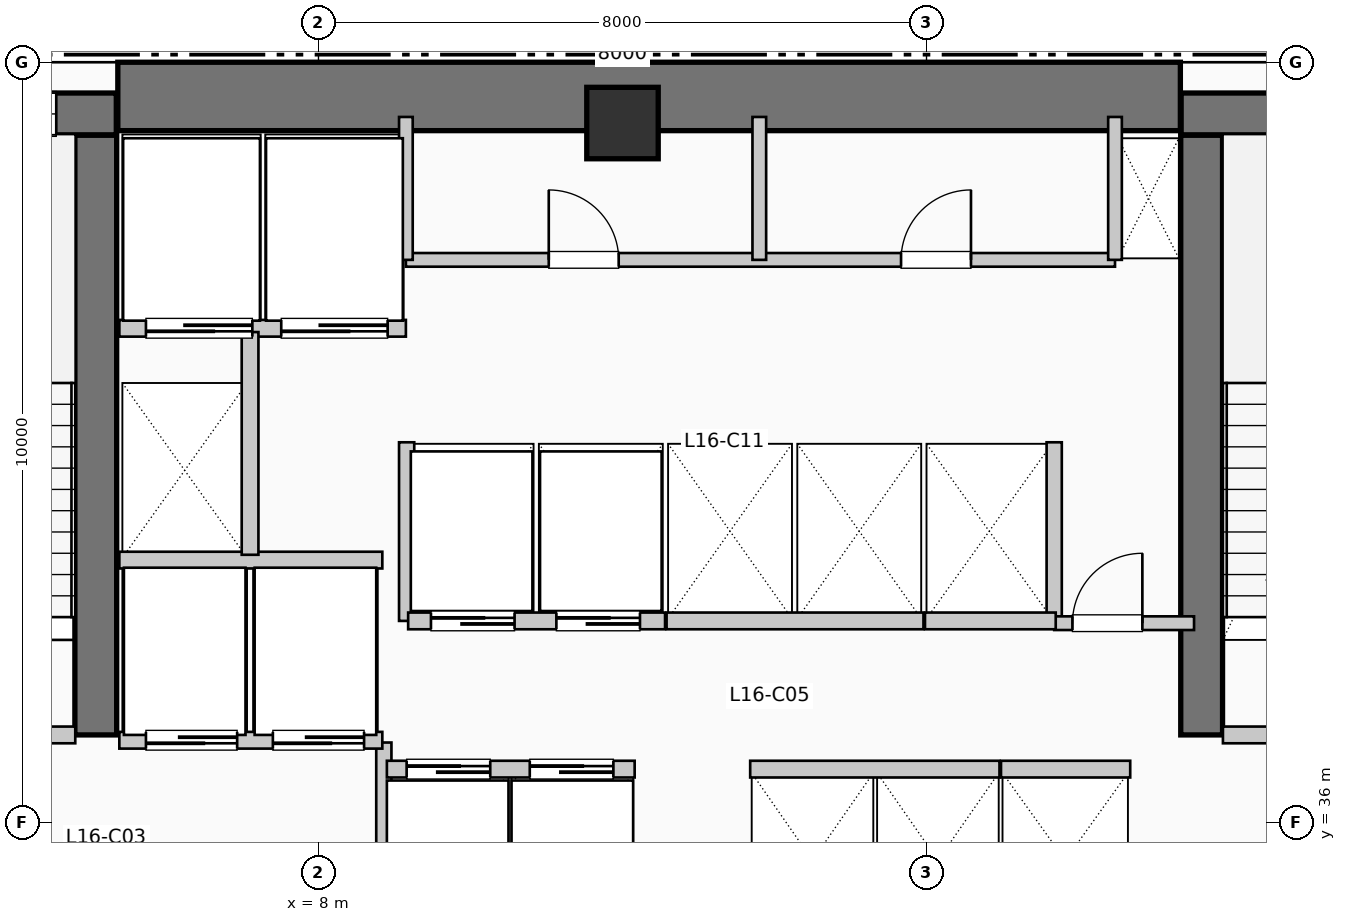
"""IFC4 building model, lengths in metres.
Left out: names, types, materials, properties, quantities, classifications, styles, units other than length and angle.
Written with IfcOpenShell. Run it as: python <this file> out.ifc"""

import sys

from ifc_helpers import new_model, si_unit, direction, frame, frame_2d, origin, origin_2d, place, context, subcontext, project, spatial, rectangle, extrude, element, fill, save


model = new_model("IFC4")
c1 = context("Model", 3, precision=1e-05, world=origin(), true_north=direction((0.0, 1.0)))
c2 = subcontext(c1, "Body", "Model", "MODEL_VIEW")
j1 = project(units=[si_unit("LENGTHUNIT", "METRE"), si_unit("PLANEANGLEUNIT", "RADIAN")], contexts=[c1])
p1 = place(None, origin())
s1 = spatial("IfcSite", under=j1, at=p1, CompositionType="ELEMENT")
p2 = place(p1, origin())
s2 = spatial("IfcBuilding", under=s1, at=p2, CompositionType="ELEMENT")
p3 = place(p2, frame((0.0, 0.0, 69.96)))
s3 = spatial("IfcBuildingStorey", under=s2, at=p3, CompositionType="ELEMENT", Elevation=69.96)
p4 = place(p3, frame((5.36, 45.55, 0.0), z_axis=(0.0, 0.0, 1.0), x_axis=(1.0, 0.0, 0.0)))
e1 = element("IfcWall", 1, at=p4, inside=s3, PredefinedType="SHEAR", context=c2, shape_type="SweptSolid", body=[
    extrude(rectangle(XDim=13.98, YDim=0.9, at=frame_2d((6.99, 0.0))), origin(), (0.0, 0.0, 1.0), 3.96),
])
p5 = place(p3, frame((5.07, 37.15, 0.0), z_axis=(0.0, 0.0, 1.0), x_axis=(0.0, 1.0, 0.0)))
e2 = element("IfcWall", 2, at=p5, inside=s3, PredefinedType="SHEAR", context=c2, shape_type="SweptSolid", body=[
    extrude(rectangle(XDim=7.89, YDim=0.55, at=frame_2d((3.945, 0.0))), origin(), (0.0, 0.0, 1.0), 3.96),
])
p6 = place(p3, frame((1.1, 45.32, 0.0), z_axis=(0.0, 0.0, 1.0), x_axis=(1.0, 0.0, 0.0)))
e3 = element("IfcWall", 3, at=p6, inside=s3, PredefinedType="SHEAR", context=c2, shape_type="SweptSolid", body=[
    extrude(rectangle(XDim=4.24, YDim=0.55, at=frame_2d((2.12, 0.0))), origin(), (0.0, 0.0, 1.0), 3.96),
])
p7 = place(p6, frame((2.05, 0.0, 1.05)))
e4 = element("IfcOpeningElement", 4, at=p7, cuts=e3, PredefinedType="OPENING", context=c2, shape_type="SweptSolid", body=[
    extrude(rectangle(XDim=1.4, YDim=1.8, at=frame_2d((0.7, 0.9))), frame((0.0, 0.285, 0.0), z_axis=(0.0, -1.0, 0.0), x_axis=(1.0, 0.0, 0.0)), (0.0, 0.0, 1.0), 0.57),
])
p8 = place(p3, frame((19.62, 37.15, 0.0), z_axis=(0.0, 0.0, 1.0), x_axis=(0.0, 1.0, 0.0)))
e5 = element("IfcWall", 5, at=p8, inside=s3, PredefinedType="SHEAR", context=c2, shape_type="SweptSolid", body=[
    extrude(rectangle(XDim=7.89, YDim=0.55, at=frame_2d((3.945, 0.0))), origin(), (0.0, 0.0, 1.0), 3.96),
])
p9 = place(p3, frame((19.35, 45.32, 0.0), z_axis=(0.0, 0.0, 1.0), x_axis=(1.0, 0.0, 0.0)))
e6 = element("IfcWall", 6, at=p9, inside=s3, PredefinedType="SHEAR", context=c2, shape_type="SweptSolid", body=[
    extrude(rectangle(XDim=3.69, YDim=0.55, at=frame_2d((1.845, 0.0))), origin(), (0.0, 0.0, 1.0), 3.96),
])
p10 = place(p9, frame((1.15, 0.0, 1.05)))
e7 = element("IfcOpeningElement", 7, at=p10, cuts=e6, PredefinedType="OPENING", context=c2, shape_type="SweptSolid", body=[
    extrude(rectangle(XDim=1.4, YDim=1.8, at=frame_2d((0.7, 0.9))), frame((0.0, 0.285, 0.0), z_axis=(0.0, -1.0, 0.0), x_axis=(1.0, 0.0, 0.0)), (0.0, 0.0, 1.0), 0.57),
])
p11 = place(p3, frame((12.0, 45.2, 0.0), z_axis=(0.0, 0.0, 1.0), x_axis=(1.0, 0.0, 0.0)))
e8 = element("IfcColumn", 8, at=p11, inside=s3, PredefinedType="COLUMN", context=c2, shape_type="SweptSolid", body=[
    extrude(rectangle(XDim=0.94, YDim=0.94, at=origin_2d()), origin(), (0.0, 0.0, 1.0), 3.96),
])
p12 = place(p3, frame((1.65, 37.15, 0.0), z_axis=(0.0, 0.0, 1.0), x_axis=(1.0, 0.0, 0.0)))
e9 = element("IfcWall", 9, at=p12, inside=s3, PredefinedType="PARTITIONING", context=c2, shape_type="SweptSolid", body=[
    extrude(rectangle(XDim=3.15, YDim=0.22, at=frame_2d((1.575, 0.0))), origin(), (0.0, 0.0, 1.0), 3.71),
])
p13 = place(p12, frame((2.05, 0.0, 0.0), z_axis=(0.0, 0.0, 1.0), x_axis=(-1.0, 0.0, 0.0)))
e10 = element("IfcOpeningElement", 10, at=p13, cuts=e9, PredefinedType="OPENING", context=c2, shape_type="SweptSolid", body=[
    extrude(rectangle(XDim=1.05, YDim=2.15, at=frame_2d((0.525, 1.075))), frame((0.0, 0.12, 0.0), z_axis=(0.0, -1.0, 0.0), x_axis=(1.0, 0.0, 0.0)), (0.0, 0.0, 1.0), 0.24),
])
p14 = place(p3, frame((8.86, 34.55, 0.0), z_axis=(0.0, 0.0, 1.0), x_axis=(0.0, 1.0, 0.0)))
e11 = element("IfcWall", 11, at=p14, inside=s3, PredefinedType="PARTITIONING", context=c2, shape_type="SweptSolid", body=[
    extrude(rectangle(XDim=2.5, YDim=0.2, at=frame_2d((1.25, 0.0))), origin(), (0.0, 0.0, 1.0), 3.71),
])
p15 = place(p3, frame((19.9, 37.15, 0.0), z_axis=(0.0, 0.0, 1.0), x_axis=(1.0, 0.0, 0.0)))
e12 = element("IfcWall", 12, at=p15, inside=s3, PredefinedType="PARTITIONING", context=c2, shape_type="SweptSolid", body=[
    extrude(rectangle(XDim=3.15, YDim=0.22, at=frame_2d((1.575, 0.0))), origin(), (0.0, 0.0, 1.0), 3.71),
])
p16 = place(p15, frame((2.05, 0.0, 0.0), z_axis=(0.0, 0.0, 1.0), x_axis=(-1.0, 0.0, 0.0)))
e13 = element("IfcOpeningElement", 13, at=p16, cuts=e12, PredefinedType="OPENING", context=c2, shape_type="SweptSolid", body=[
    extrude(rectangle(XDim=1.05, YDim=2.15, at=frame_2d((0.525, 1.075))), frame((0.0, 0.12, 0.0), z_axis=(0.0, -1.0, 0.0), x_axis=(1.0, 0.0, 0.0)), (0.0, 0.0, 1.0), 0.24),
])
p17 = place(p3, frame((5.38, 37.08, 0.0), z_axis=(0.0, 0.0, 1.0), x_axis=(1.0, 0.0, 0.0)))
e14 = element("IfcWall", 14, at=p17, inside=s3, PredefinedType="PARTITIONING", context=c2, shape_type="SweptSolid", body=[
    extrude(rectangle(XDim=3.46, YDim=0.22, at=frame_2d((1.73, 0.0))), origin(), (0.0, 0.0, 1.0), 3.71),
])
p18 = place(p17, frame((1.55, 0.0, 0.0), z_axis=(0.0, 0.0, 1.0), x_axis=(-1.0, 0.0, 0.0)))
e15 = element("IfcOpeningElement", 15, at=p18, cuts=e14, PredefinedType="OPENING", context=c2, shape_type="SweptSolid", body=[
    extrude(rectangle(XDim=1.2, YDim=2.2, at=frame_2d((0.6, 1.1))), frame((0.0, 0.12, 0.0), z_axis=(0.0, -1.0, 0.0), x_axis=(1.0, 0.0, 0.0)), (0.0, 0.0, 1.0), 0.24),
])
p19 = place(p17, frame((3.22, 0.0, 0.0), z_axis=(0.0, 0.0, 1.0), x_axis=(-1.0, 0.0, 0.0)))
e16 = element("IfcOpeningElement", 16, at=p19, cuts=e14, PredefinedType="OPENING", context=c2, shape_type="SweptSolid", body=[
    extrude(rectangle(XDim=1.2, YDim=2.2, at=frame_2d((0.6, 1.1))), frame((0.0, 0.12, 0.0), z_axis=(0.0, -1.0, 0.0), x_axis=(1.0, 0.0, 0.0)), (0.0, 0.0, 1.0), 0.24),
])
p20 = place(p3, frame((5.38, 39.45, 0.0), z_axis=(0.0, 0.0, 1.0), x_axis=(1.0, 0.0, 0.0)))
e17 = element("IfcWall", 17, at=p20, inside=s3, PredefinedType="PARTITIONING", context=c2, shape_type="SweptSolid", body=[
    extrude(rectangle(XDim=3.46, YDim=0.22, at=frame_2d((1.73, 0.0))), origin(), (0.0, 0.0, 1.0), 3.71),
])
p21 = place(p3, frame((5.38, 42.5, 0.0), z_axis=(0.0, 0.0, 1.0), x_axis=(1.0, 0.0, 0.0)))
e18 = element("IfcWall", 18, at=p21, inside=s3, PredefinedType="PARTITIONING", context=c2, shape_type="SweptSolid", body=[
    extrude(rectangle(XDim=3.77, YDim=0.22, at=frame_2d((1.885, 0.0))), origin(), (0.0, 0.0, 1.0), 3.71),
])
p22 = place(p21, frame((1.75, 0.0, 0.0), z_axis=(0.0, 0.0, 1.0), x_axis=(-1.0, 0.0, 0.0)))
e19 = element("IfcOpeningElement", 19, at=p22, cuts=e18, PredefinedType="OPENING", context=c2, shape_type="SweptSolid", body=[
    extrude(rectangle(XDim=1.4, YDim=2.2, at=frame_2d((0.7, 1.1))), frame((0.0, 0.12, 0.0), z_axis=(0.0, -1.0, 0.0), x_axis=(1.0, 0.0, 0.0)), (0.0, 0.0, 1.0), 0.24),
])
p23 = place(p21, frame((3.53, 0.0, 0.0), z_axis=(0.0, 0.0, 1.0), x_axis=(-1.0, 0.0, 0.0)))
e20 = element("IfcOpeningElement", 20, at=p23, cuts=e18, PredefinedType="OPENING", context=c2, shape_type="SweptSolid", body=[
    extrude(rectangle(XDim=1.4, YDim=2.2, at=frame_2d((0.7, 1.1))), frame((0.0, 0.12, 0.0), z_axis=(0.0, -1.0, 0.0), x_axis=(1.0, 0.0, 0.0)), (0.0, 0.0, 1.0), 0.24),
])
p24 = place(p3, frame((7.1, 39.52, 0.0), z_axis=(0.0, 0.0, 1.0), x_axis=(0.0, 1.0, 0.0)))
e21 = element("IfcWall", 21, at=p24, inside=s3, PredefinedType="PARTITIONING", context=c2, shape_type="SweptSolid", body=[
    extrude(rectangle(XDim=2.93, YDim=0.22, at=frame_2d((1.465, 0.0))), origin(), (0.0, 0.0, 1.0), 3.71),
])
for number, where, z_axis, x_axis in (
    (22, (9.16, 38.65, 0.0), (0.0, 0.0, 1.0), (0.0, 1.0, 0.0)),
    (23, (17.68, 38.65, 0.0), (0.0, 0.0, 1.0), (0.0, 1.0, 0.0)),
):
    element("IfcWall", number, at=place(p3, frame(where, z_axis=z_axis, x_axis=x_axis)), inside=s3, PredefinedType="PARTITIONING", context=c2, shape_type="SweptSolid", body=[
        extrude(rectangle(XDim=2.35, YDim=0.2, at=frame_2d((1.175, 0.0))), origin(), (0.0, 0.0, 1.0), 3.71),
    ])
p25 = place(p3, frame((17.68, 38.62, 0.0), z_axis=(0.0, 0.0, 1.0), x_axis=(1.0, 0.0, 0.0)))
e24 = element("IfcWall", 24, at=p25, inside=s3, PredefinedType="PARTITIONING", context=c2, shape_type="SweptSolid", body=[
    extrude(rectangle(XDim=1.84, YDim=0.18, at=frame_2d((0.92, 0.0))), origin(), (0.0, 0.0, 1.0), 3.71),
])
p26 = place(p25, frame((0.24, 0.0, 0.0)))
e25 = element("IfcOpeningElement", 25, at=p26, cuts=e24, PredefinedType="OPENING", context=c2, shape_type="SweptSolid", body=[
    extrude(rectangle(XDim=0.92, YDim=2.1, at=frame_2d((0.46, 1.05))), frame((0.0, 0.1, 0.0), z_axis=(0.0, -1.0, 0.0), x_axis=(1.0, 0.0, 0.0)), (0.0, 0.0, 1.0), 0.2),
])
p27 = place(p3, frame((8.9, 36.7, 0.0), z_axis=(0.0, 0.0, 1.0), x_axis=(1.0, 0.0, 0.0)))
e26 = element("IfcWall", 26, at=p27, inside=s3, PredefinedType="PARTITIONING", context=c2, shape_type="SweptSolid", body=[
    extrude(rectangle(XDim=3.26, YDim=0.22, at=frame_2d((1.63, 0.0))), origin(), (0.0, 0.0, 1.0), 3.71),
])
p28 = place(p27, frame((0.26, 0.0, 0.0)))
e27 = element("IfcOpeningElement", 27, at=p28, cuts=e26, PredefinedType="OPENING", context=c2, shape_type="SweptSolid", body=[
    extrude(rectangle(XDim=1.1, YDim=2.2, at=frame_2d((0.55, 1.1))), frame((0.0, 0.12, 0.0), z_axis=(0.0, -1.0, 0.0), x_axis=(1.0, 0.0, 0.0)), (0.0, 0.0, 1.0), 0.24),
])
p29 = place(p27, frame((1.88, 0.0, 0.0)))
e28 = element("IfcOpeningElement", 28, at=p29, cuts=e26, PredefinedType="OPENING", context=c2, shape_type="SweptSolid", body=[
    extrude(rectangle(XDim=1.1, YDim=2.2, at=frame_2d((0.55, 1.1))), frame((0.0, 0.12, 0.0), z_axis=(0.0, -1.0, 0.0), x_axis=(1.0, 0.0, 0.0)), (0.0, 0.0, 1.0), 0.24),
])
p30 = place(p3, frame((9.18, 38.65, 0.0), z_axis=(0.0, 0.0, 1.0), x_axis=(1.0, 0.0, 0.0)))
e29 = element("IfcWall", 29, at=p30, inside=s3, PredefinedType="PARTITIONING", context=c2, shape_type="SweptSolid", body=[
    extrude(rectangle(XDim=3.38, YDim=0.22, at=frame_2d((1.69, 0.0))), origin(), (0.0, 0.0, 1.0), 3.71),
])
p31 = place(p30, frame((0.3, 0.0, 0.0)))
e30 = element("IfcOpeningElement", 30, at=p31, cuts=e29, PredefinedType="OPENING", context=c2, shape_type="SweptSolid", body=[
    extrude(rectangle(XDim=1.1, YDim=2.2, at=frame_2d((0.55, 1.1))), frame((0.0, 0.12, 0.0), z_axis=(0.0, -1.0, 0.0), x_axis=(1.0, 0.0, 0.0)), (0.0, 0.0, 1.0), 0.24),
])
p32 = place(p30, frame((1.95, 0.0, 0.0)))
e31 = element("IfcOpeningElement", 31, at=p32, cuts=e29, PredefinedType="OPENING", context=c2, shape_type="SweptSolid", body=[
    extrude(rectangle(XDim=1.1, YDim=2.2, at=frame_2d((0.55, 1.1))), frame((0.0, 0.12, 0.0), z_axis=(0.0, -1.0, 0.0), x_axis=(1.0, 0.0, 0.0)), (0.0, 0.0, 1.0), 0.24),
])
p33 = place(p3, frame((13.68, 36.7, 0.0), z_axis=(0.0, 0.0, 1.0), x_axis=(1.0, 0.0, 0.0)))
e32 = element("IfcWall", 32, at=p33, inside=s3, PredefinedType="PARTITIONING", context=c2, shape_type="SweptSolid", body=[
    extrude(rectangle(XDim=3.28, YDim=0.22, at=frame_2d((1.64, 0.0))), origin(), (0.0, 0.0, 1.0), 3.71),
])
p34 = place(p3, frame((12.58, 38.65, 0.0), z_axis=(0.0, 0.0, 1.0), x_axis=(1.0, 0.0, 0.0)))
e33 = element("IfcWall", 33, at=p34, inside=s3, PredefinedType="PARTITIONING", context=c2, shape_type="SweptSolid", body=[
    extrude(rectangle(XDim=3.38, YDim=0.22, at=frame_2d((1.69, 0.0))), origin(), (0.0, 0.0, 1.0), 3.71),
])
p35 = place(p3, frame((16.98, 36.7, 0.0), z_axis=(0.0, 0.0, 1.0), x_axis=(1.0, 0.0, 0.0)))
e34 = element("IfcWall", 34, at=p35, inside=s3, PredefinedType="PARTITIONING", context=c2, shape_type="SweptSolid", body=[
    extrude(rectangle(XDim=1.7, YDim=0.22, at=frame_2d((0.85, 0.0))), origin(), (0.0, 0.0, 1.0), 3.71),
])
p36 = place(p3, frame((15.98, 38.65, 0.0), z_axis=(0.0, 0.0, 1.0), x_axis=(1.0, 0.0, 0.0)))
e35 = element("IfcWall", 35, at=p36, inside=s3, PredefinedType="PARTITIONING", context=c2, shape_type="SweptSolid", body=[
    extrude(rectangle(XDim=1.72, YDim=0.22, at=frame_2d((0.86, 0.0))), origin(), (0.0, 0.0, 1.0), 3.71),
])
p37 = place(p3, frame((9.15, 43.4, 0.0), z_axis=(0.0, 0.0, 1.0), x_axis=(1.0, 0.0, 0.0)))
e36 = element("IfcWall", 36, at=p37, inside=s3, PredefinedType="PLUMBINGWALL", context=c2, shape_type="SweptSolid", body=[
    extrude(rectangle(XDim=9.33, YDim=0.18, at=frame_2d((4.665, 0.0))), origin(), (0.0, 0.0, 1.0), 3.71),
])
p38 = place(p37, frame((1.88, 0.0, 0.0)))
e37 = element("IfcOpeningElement", 37, at=p38, cuts=e36, PredefinedType="OPENING", context=c2, shape_type="SweptSolid", body=[
    extrude(rectangle(XDim=0.92, YDim=2.1, at=frame_2d((0.46, 1.05))), frame((0.0, 0.1, 0.0), z_axis=(0.0, -1.0, 0.0), x_axis=(1.0, 0.0, 0.0)), (0.0, 0.0, 1.0), 0.2),
])
p39 = place(p37, frame((6.515, 0.0, 0.0)))
e38 = element("IfcOpeningElement", 38, at=p39, cuts=e36, PredefinedType="OPENING", context=c2, shape_type="SweptSolid", body=[
    extrude(rectangle(XDim=0.92, YDim=2.1, at=frame_2d((0.46, 1.05))), frame((0.0, 0.1, 0.0), z_axis=(0.0, -1.0, 0.0), x_axis=(1.0, 0.0, 0.0)), (0.0, 0.0, 1.0), 0.2),
])
for number, where, z_axis, x_axis in (
    (39, (9.15, 43.4, 0.0), (0.0, 0.0, 1.0), (0.0, 1.0, 0.0)),
    (40, (18.48, 43.4, 0.0), (0.0, 0.0, 1.0), (0.0, 1.0, 0.0)),
    (41, (13.8, 43.4, 0.0), (0.0, 0.0, 1.0), (0.0, 1.0, 0.0)),
):
    element("IfcWall", number, at=place(p3, frame(where, z_axis=z_axis, x_axis=x_axis)), inside=s3, PredefinedType="PLUMBINGWALL", context=c2, shape_type="SweptSolid", body=[
        extrude(rectangle(XDim=1.88, YDim=0.18, at=frame_2d((0.94, 0.0))), origin(), (0.0, 0.0, 1.0), 3.71),
    ])
p40 = place(p7, origin())
e42 = element("IfcWindow", 42, at=p40, inside=s3, PartitioningType="SINGLE_PANEL", PredefinedType="WINDOW", context=c2, shape_type="SweptSolid", body=[
    extrude(rectangle(XDim=1.4, YDim=1.8, at=frame_2d((0.7, 0.9))), frame((0.0, 0.03, 0.0), z_axis=(0.0, -1.0, 0.0), x_axis=(1.0, 0.0, 0.0)), (0.0, 0.0, 1.0), 0.06),
])
fill(e4, e42)
p41 = place(p18, origin())
e43 = element("IfcDoor", 43, at=p41, inside=s3, OperationType="SLIDING_TO_RIGHT", PredefinedType="DOOR", context=c2, shape_type="SweptSolid", body=[
    extrude(rectangle(XDim=1.2, YDim=2.2, at=frame_2d((0.6, 1.1))), frame((0.0, 0.025, 0.0), z_axis=(0.0, -1.0, 0.0), x_axis=(1.0, 0.0, 0.0)), (0.0, 0.0, 1.0), 0.05),
])
fill(e15, e43)
p42 = place(p19, origin())
e44 = element("IfcDoor", 44, at=p42, inside=s3, OperationType="SLIDING_TO_RIGHT", PredefinedType="DOOR", context=c2, shape_type="SweptSolid", body=[
    extrude(rectangle(XDim=1.2, YDim=2.2, at=frame_2d((0.6, 1.1))), frame((0.0, 0.025, 0.0), z_axis=(0.0, -1.0, 0.0), x_axis=(1.0, 0.0, 0.0)), (0.0, 0.0, 1.0), 0.05),
])
fill(e16, e44)
p43 = place(p22, origin())
e45 = element("IfcDoor", 45, at=p43, inside=s3, OperationType="SLIDING_TO_LEFT", PredefinedType="DOOR", context=c2, shape_type="SweptSolid", body=[
    extrude(rectangle(XDim=1.4, YDim=2.2, at=frame_2d((0.7, 1.1))), frame((0.0, 0.025, 0.0), z_axis=(0.0, -1.0, 0.0), x_axis=(1.0, 0.0, 0.0)), (0.0, 0.0, 1.0), 0.05),
])
fill(e19, e45)
p44 = place(p23, origin())
e46 = element("IfcDoor", 46, at=p44, inside=s3, OperationType="SLIDING_TO_LEFT", PredefinedType="DOOR", context=c2, shape_type="SweptSolid", body=[
    extrude(rectangle(XDim=1.4, YDim=2.2, at=frame_2d((0.7, 1.1))), frame((0.0, 0.025, 0.0), z_axis=(0.0, -1.0, 0.0), x_axis=(1.0, 0.0, 0.0)), (0.0, 0.0, 1.0), 0.05),
])
fill(e20, e46)
p45 = place(p26, origin())
e47 = element("IfcDoor", 47, at=p45, inside=s3, OperationType="SINGLE_SWING_RIGHT", PredefinedType="DOOR", context=c2, shape_type="SweptSolid", body=[
    extrude(rectangle(XDim=0.92, YDim=2.1, at=frame_2d((0.46, 1.05))), frame((0.0, 0.025, 0.0), z_axis=(0.0, -1.0, 0.0), x_axis=(1.0, 0.0, 0.0)), (0.0, 0.0, 1.0), 0.05),
])
fill(e25, e47)
p46 = place(p28, origin())
e48 = element("IfcDoor", 48, at=p46, inside=s3, OperationType="SLIDING_TO_LEFT", PredefinedType="DOOR", context=c2, shape_type="SweptSolid", body=[
    extrude(rectangle(XDim=1.1, YDim=2.2, at=frame_2d((0.55, 1.1))), frame((0.0, 0.025, 0.0), z_axis=(0.0, -1.0, 0.0), x_axis=(1.0, 0.0, 0.0)), (0.0, 0.0, 1.0), 0.05),
])
fill(e27, e48)
p47 = place(p29, origin())
e49 = element("IfcDoor", 49, at=p47, inside=s3, OperationType="SLIDING_TO_LEFT", PredefinedType="DOOR", context=c2, shape_type="SweptSolid", body=[
    extrude(rectangle(XDim=1.1, YDim=2.2, at=frame_2d((0.55, 1.1))), frame((0.0, 0.025, 0.0), z_axis=(0.0, -1.0, 0.0), x_axis=(1.0, 0.0, 0.0)), (0.0, 0.0, 1.0), 0.05),
])
fill(e28, e49)
p48 = place(p31, origin())
e50 = element("IfcDoor", 50, at=p48, inside=s3, OperationType="SLIDING_TO_LEFT", PredefinedType="DOOR", context=c2, shape_type="SweptSolid", body=[
    extrude(rectangle(XDim=1.1, YDim=2.2, at=frame_2d((0.55, 1.1))), frame((0.0, 0.025, 0.0), z_axis=(0.0, -1.0, 0.0), x_axis=(1.0, 0.0, 0.0)), (0.0, 0.0, 1.0), 0.05),
])
fill(e30, e50)
p49 = place(p32, origin())
e51 = element("IfcDoor", 51, at=p49, inside=s3, OperationType="SLIDING_TO_LEFT", PredefinedType="DOOR", context=c2, shape_type="SweptSolid", body=[
    extrude(rectangle(XDim=1.1, YDim=2.2, at=frame_2d((0.55, 1.1))), frame((0.0, 0.025, 0.0), z_axis=(0.0, -1.0, 0.0), x_axis=(1.0, 0.0, 0.0)), (0.0, 0.0, 1.0), 0.05),
])
fill(e31, e51)
p50 = place(p38, origin())
e52 = element("IfcDoor", 52, at=p50, inside=s3, OperationType="SINGLE_SWING_LEFT", PredefinedType="DOOR", context=c2, shape_type="SweptSolid", body=[
    extrude(rectangle(XDim=0.92, YDim=2.1, at=frame_2d((0.46, 1.05))), frame((0.0, 0.025, 0.0), z_axis=(0.0, -1.0, 0.0), x_axis=(1.0, 0.0, 0.0)), (0.0, 0.0, 1.0), 0.05),
])
fill(e37, e52)
p51 = place(p39, origin())
e53 = element("IfcDoor", 53, at=p51, inside=s3, OperationType="SINGLE_SWING_RIGHT", PredefinedType="DOOR", context=c2, shape_type="SweptSolid", body=[
    extrude(rectangle(XDim=0.92, YDim=2.1, at=frame_2d((0.46, 1.05))), frame((0.0, 0.025, 0.0), z_axis=(0.0, -1.0, 0.0), x_axis=(1.0, 0.0, 0.0)), (0.0, 0.0, 1.0), 0.05),
])
fill(e38, e53)
save(model, sys.argv[1])
